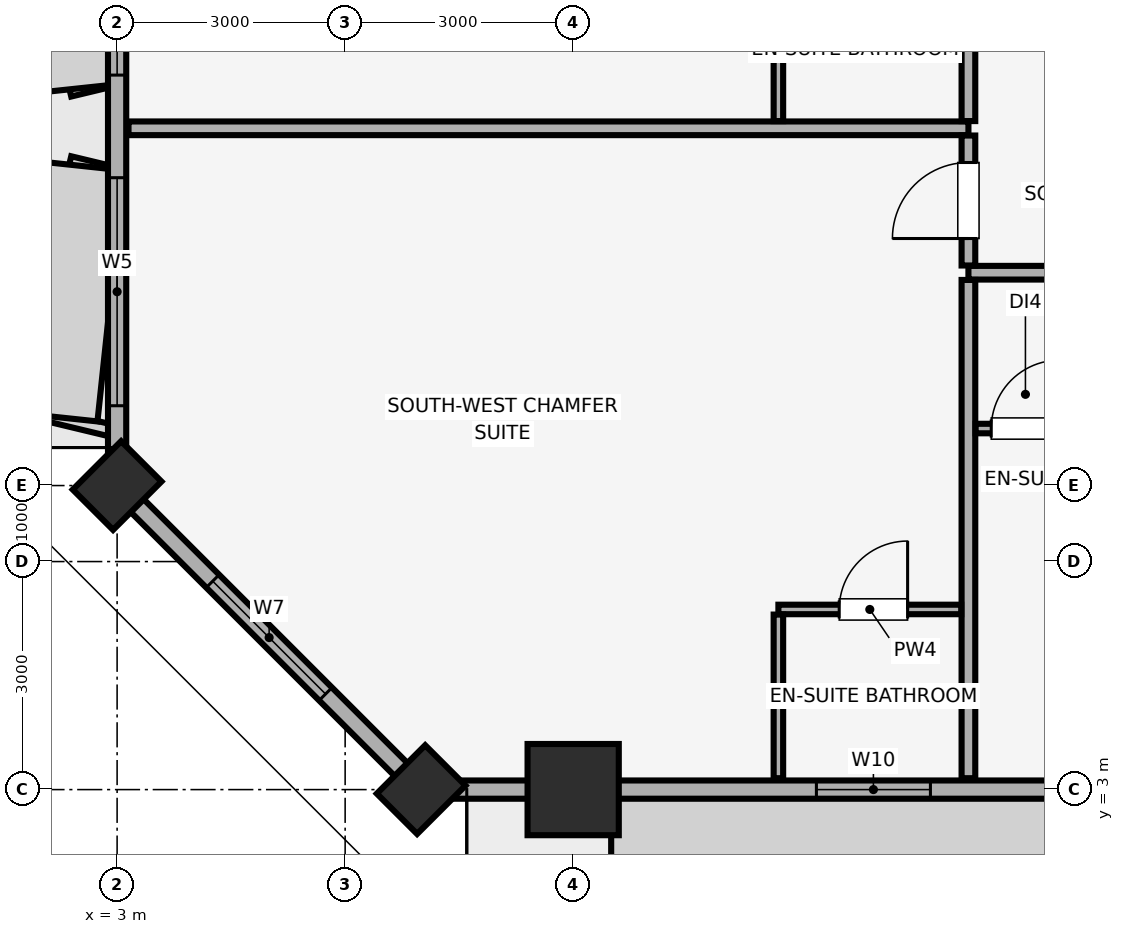
"""IFC4 building model, lengths in metres.
Left out: names, types, materials, properties, quantities, classifications, styles, units other than length and angle.
Written with IfcOpenShell. Run it as: python <this file> out.ifc"""

import sys

from ifc_helpers import new_model, si_unit, direction, frame, frame_2d, origin, origin_2d, place, context, subcontext, project, spatial, rectangle, extrude, element, fill, save


model = new_model("IFC4")
c1 = context("Model", 3, precision=1e-05, world=origin(), true_north=direction((0.0, 1.0)))
c2 = subcontext(c1, "Body", "Model", "MODEL_VIEW")
j1 = project(units=[si_unit("LENGTHUNIT", "METRE"), si_unit("PLANEANGLEUNIT", "RADIAN")], contexts=[c1])
p1 = place(None, origin())
s1 = spatial("IfcSite", under=j1, at=p1, CompositionType="ELEMENT")
p2 = place(p1, origin())
s2 = spatial("IfcBuilding", under=s1, at=p2, CompositionType="ELEMENT")
p3 = place(p2, frame((0.0, 0.0, 135.35)))
s3 = spatial("IfcBuildingStorey", under=s2, at=p3, CompositionType="ELEMENT", Elevation=135.35)
p4 = place(p3, frame((9.0, 3.0, 0.0), z_axis=(0.0, 0.0, 1.0), x_axis=(1.0, 0.0, 0.0)))
e1 = element("IfcColumn", 1, at=p4, inside=s3, PredefinedType="COLUMN", context=c2, shape_type="SweptSolid", body=[
    extrude(rectangle(XDim=1.2, YDim=1.2, at=origin_2d()), origin(), (0.0, 0.0, 1.0), 3.56),
])
for number, where, z_axis, x_axis in (
    (2, (7.0, 3.0, 0.0), (0.0, 0.0, 1.0), (0.707, 0.707, 0.0)),
    (3, (3.0, 7.0, 0.0), (0.0, 0.0, 1.0), (0.707, 0.707, 0.0)),
):
    element("IfcColumn", number, at=place(p3, frame(where, z_axis=z_axis, x_axis=x_axis)), inside=s3, PredefinedType="PILASTER", context=c2, shape_type="SweptSolid", body=[
        extrude(rectangle(XDim=0.9, YDim=0.75, at=origin_2d()), origin(), (0.0, 0.0, 1.0), 3.56),
    ])
p5 = place(p3, frame((7.0, 3.0, 0.0), z_axis=(0.0, 0.0, 1.0), x_axis=(1.0, 0.0, 0.0)))
e4 = element("IfcWall", 4, at=p5, inside=s3, PredefinedType="SOLIDWALL", context=c2, shape_type="SweptSolid", body=[
    extrude(rectangle(XDim=70.0, YDim=0.24, at=frame_2d((35.0, 0.0))), origin(), (0.0, 0.0, 1.0), 2.61),
])
p6 = place(p5, frame((19.517, 0.0, 0.0)))
e5 = element("IfcOpeningElement", 5, at=p6, cuts=e4, PredefinedType="OPENING", context=c2, shape_type="SweptSolid", body=[
    extrude(rectangle(XDim=1.1, YDim=2.15, at=frame_2d((0.55, 1.075))), frame((0.0, 0.13, 0.0), z_axis=(0.0, -1.0, 0.0), x_axis=(1.0, 0.0, 0.0)), (0.0, 0.0, 1.0), 0.26),
])
p7 = place(p5, frame((34.45, 0.0, 0.0)))
e6 = element("IfcOpeningElement", 6, at=p7, cuts=e4, PredefinedType="OPENING", context=c2, shape_type="SweptSolid", body=[
    extrude(rectangle(XDim=1.1, YDim=2.15, at=frame_2d((0.55, 1.075))), frame((0.0, 0.13, 0.0), z_axis=(0.0, -1.0, 0.0), x_axis=(1.0, 0.0, 0.0)), (0.0, 0.0, 1.0), 0.26),
])
p8 = place(p5, frame((49.421, 0.0, 0.0)))
e7 = element("IfcOpeningElement", 7, at=p8, cuts=e4, PredefinedType="OPENING", context=c2, shape_type="SweptSolid", body=[
    extrude(rectangle(XDim=1.1, YDim=2.15, at=frame_2d((0.55, 1.075))), frame((0.0, 0.13, 0.0), z_axis=(0.0, -1.0, 0.0), x_axis=(1.0, 0.0, 0.0)), (0.0, 0.0, 1.0), 0.26),
])
p9 = place(p5, frame((5.2, 0.0, 0.85)))
e8 = element("IfcOpeningElement", 8, at=p9, cuts=e4, PredefinedType="OPENING", context=c2, shape_type="SweptSolid", body=[
    extrude(rectangle(XDim=1.5, YDim=1.4, at=frame_2d((0.75, 0.7))), frame((0.0, 0.13, 0.0), z_axis=(0.0, -1.0, 0.0), x_axis=(1.0, 0.0, 0.0)), (0.0, 0.0, 1.0), 0.26),
])
p10 = place(p5, frame((10.163, 0.0, 0.85)))
e9 = element("IfcOpeningElement", 9, at=p10, cuts=e4, PredefinedType="OPENING", context=c2, shape_type="SweptSolid", body=[
    extrude(rectangle(XDim=1.5, YDim=1.4, at=frame_2d((0.75, 0.7))), frame((0.0, 0.13, 0.0), z_axis=(0.0, -1.0, 0.0), x_axis=(1.0, 0.0, 0.0)), (0.0, 0.0, 1.0), 0.26),
])
p11 = place(p5, frame((12.913, 0.0, 0.85)))
e10 = element("IfcOpeningElement", 10, at=p11, cuts=e4, PredefinedType="OPENING", context=c2, shape_type="SweptSolid", body=[
    extrude(rectangle(XDim=2.4, YDim=1.5, at=frame_2d((1.2, 0.75))), frame((0.0, 0.13, 0.0), z_axis=(0.0, -1.0, 0.0), x_axis=(1.0, 0.0, 0.0)), (0.0, 0.0, 1.0), 0.26),
])
p12 = place(p5, frame((24.45, 0.0, 0.85)))
e11 = element("IfcOpeningElement", 11, at=p12, cuts=e4, PredefinedType="OPENING", context=c2, shape_type="SweptSolid", body=[
    extrude(rectangle(XDim=2.4, YDim=1.5, at=frame_2d((1.2, 0.75))), frame((0.0, 0.13, 0.0), z_axis=(0.0, -1.0, 0.0), x_axis=(1.0, 0.0, 0.0)), (0.0, 0.0, 1.0), 0.26),
])
p13 = place(p5, frame((28.101, 0.0, 0.85)))
e12 = element("IfcOpeningElement", 12, at=p13, cuts=e4, PredefinedType="OPENING", context=c2, shape_type="SweptSolid", body=[
    extrude(rectangle(XDim=1.5, YDim=1.4, at=frame_2d((0.75, 0.7))), frame((0.0, 0.13, 0.0), z_axis=(0.0, -1.0, 0.0), x_axis=(1.0, 0.0, 0.0)), (0.0, 0.0, 1.0), 0.26),
])
p14 = place(p5, frame((40.239, 0.0, 0.85)))
e13 = element("IfcOpeningElement", 13, at=p14, cuts=e4, PredefinedType="OPENING", context=c2, shape_type="SweptSolid", body=[
    extrude(rectangle(XDim=1.5, YDim=1.4, at=frame_2d((0.75, 0.7))), frame((0.0, 0.13, 0.0), z_axis=(0.0, -1.0, 0.0), x_axis=(1.0, 0.0, 0.0)), (0.0, 0.0, 1.0), 0.26),
])
p15 = place(p5, frame((42.989, 0.0, 0.85)))
e14 = element("IfcOpeningElement", 14, at=p15, cuts=e4, PredefinedType="OPENING", context=c2, shape_type="SweptSolid", body=[
    extrude(rectangle(XDim=2.4, YDim=1.5, at=frame_2d((1.2, 0.75))), frame((0.0, 0.13, 0.0), z_axis=(0.0, -1.0, 0.0), x_axis=(1.0, 0.0, 0.0)), (0.0, 0.0, 1.0), 0.26),
])
p16 = place(p5, frame((54.581, 0.0, 0.85)))
e15 = element("IfcOpeningElement", 15, at=p16, cuts=e4, PredefinedType="OPENING", context=c2, shape_type="SweptSolid", body=[
    extrude(rectangle(XDim=2.4, YDim=1.5, at=frame_2d((1.2, 0.75))), frame((0.0, 0.13, 0.0), z_axis=(0.0, -1.0, 0.0), x_axis=(1.0, 0.0, 0.0)), (0.0, 0.0, 1.0), 0.26),
])
p17 = place(p5, frame((58.23, 0.0, 0.85)))
e16 = element("IfcOpeningElement", 16, at=p17, cuts=e4, PredefinedType="OPENING", context=c2, shape_type="SweptSolid", body=[
    extrude(rectangle(XDim=1.5, YDim=1.4, at=frame_2d((0.75, 0.7))), frame((0.0, 0.13, 0.0), z_axis=(0.0, -1.0, 0.0), x_axis=(1.0, 0.0, 0.0)), (0.0, 0.0, 1.0), 0.26),
])
p18 = place(p5, frame((63.3, 0.0, 0.85)))
e17 = element("IfcOpeningElement", 17, at=p18, cuts=e4, PredefinedType="OPENING", context=c2, shape_type="SweptSolid", body=[
    extrude(rectangle(XDim=1.5, YDim=1.4, at=frame_2d((0.75, 0.7))), frame((0.0, 0.13, 0.0), z_axis=(0.0, -1.0, 0.0), x_axis=(1.0, 0.0, 0.0)), (0.0, 0.0, 1.0), 0.26),
])
p19 = place(p3, frame((3.0, 45.0, 0.0), z_axis=(0.0, 0.0, 1.0), x_axis=(0.0, -1.0, 0.0)))
e18 = element("IfcWall", 18, at=p19, inside=s3, PredefinedType="SOLIDWALL", context=c2, shape_type="SweptSolid", body=[
    extrude(rectangle(XDim=38.0, YDim=0.24, at=frame_2d((19.0, 0.0))), origin(), (0.0, 0.0, 1.0), 2.61),
])
p20 = place(p19, frame((22.1, 0.0, 0.0)))
e19 = element("IfcOpeningElement", 19, at=p20, cuts=e18, PredefinedType="OPENING", context=c2, shape_type="SweptSolid", body=[
    extrude(rectangle(XDim=1.4, YDim=2.2, at=frame_2d((0.7, 1.1))), frame((0.0, 0.13, 0.0), z_axis=(0.0, -1.0, 0.0), x_axis=(1.0, 0.0, 0.0)), (0.0, 0.0, 1.0), 0.26),
])
p21 = place(p19, frame((33.95, 0.0, 0.85)))
e20 = element("IfcOpeningElement", 20, at=p21, cuts=e18, PredefinedType="OPENING", context=c2, shape_type="SweptSolid", body=[
    extrude(rectangle(XDim=3.0, YDim=1.5, at=frame_2d((1.5, 0.75))), frame((0.0, 0.13, 0.0), z_axis=(0.0, -1.0, 0.0), x_axis=(1.0, 0.0, 0.0)), (0.0, 0.0, 1.0), 0.26),
])
p22 = place(p19, frame((31.1, 0.0, 0.85)))
e21 = element("IfcOpeningElement", 21, at=p22, cuts=e18, PredefinedType="OPENING", context=c2, shape_type="SweptSolid", body=[
    extrude(rectangle(XDim=1.5, YDim=1.4, at=frame_2d((0.75, 0.7))), frame((0.0, 0.13, 0.0), z_axis=(0.0, -1.0, 0.0), x_axis=(1.0, 0.0, 0.0)), (0.0, 0.0, 1.0), 0.26),
])
p23 = place(p19, frame((25.16, 0.0, 0.85)))
e22 = element("IfcOpeningElement", 22, at=p23, cuts=e18, PredefinedType="OPENING", context=c2, shape_type="SweptSolid", body=[
    extrude(rectangle(XDim=3.0, YDim=1.5, at=frame_2d((1.5, 0.75))), frame((0.0, 0.13, 0.0), z_axis=(0.0, -1.0, 0.0), x_axis=(1.0, 0.0, 0.0)), (0.0, 0.0, 1.0), 0.26),
])
p24 = place(p19, frame((17.44, 0.0, 0.85)))
e23 = element("IfcOpeningElement", 23, at=p24, cuts=e18, PredefinedType="OPENING", context=c2, shape_type="SweptSolid", body=[
    extrude(rectangle(XDim=3.0, YDim=1.5, at=frame_2d((1.5, 0.75))), frame((0.0, 0.13, 0.0), z_axis=(0.0, -1.0, 0.0), x_axis=(1.0, 0.0, 0.0)), (0.0, 0.0, 1.0), 0.26),
])
p25 = place(p19, frame((9.85, 0.0, 0.85)))
e24 = element("IfcOpeningElement", 24, at=p25, cuts=e18, PredefinedType="OPENING", context=c2, shape_type="SweptSolid", body=[
    extrude(rectangle(XDim=3.0, YDim=1.5, at=frame_2d((1.5, 0.75))), frame((0.0, 0.13, 0.0), z_axis=(0.0, -1.0, 0.0), x_axis=(1.0, 0.0, 0.0)), (0.0, 0.0, 1.0), 0.26),
])
p26 = place(p19, frame((1.085, 0.0, 0.85)))
e25 = element("IfcOpeningElement", 25, at=p26, cuts=e18, PredefinedType="OPENING", context=c2, shape_type="SweptSolid", body=[
    extrude(rectangle(XDim=3.0, YDim=1.5, at=frame_2d((1.5, 0.75))), frame((0.0, 0.13, 0.0), z_axis=(0.0, -1.0, 0.0), x_axis=(1.0, 0.0, 0.0)), (0.0, 0.0, 1.0), 0.26),
])
p27 = place(p3, frame((3.0, 7.0, 0.0), z_axis=(0.0, 0.0, 1.0), x_axis=(0.707106781187, -0.707106781187, 0.0)))
e26 = element("IfcWall", 26, at=p27, inside=s3, PredefinedType="SOLIDWALL", context=c2, shape_type="SweptSolid", body=[
    extrude(rectangle(XDim=5.657, YDim=0.24, at=frame_2d((2.828, 0.0))), origin(), (0.0, 0.0, 1.0), 2.61),
])
p28 = place(p27, frame((1.778, 0.0, 0.85)))
e27 = element("IfcOpeningElement", 27, at=p28, cuts=e26, PredefinedType="OPENING", context=c2, shape_type="SweptSolid", body=[
    extrude(rectangle(XDim=2.1, YDim=1.6, at=frame_2d((1.05, 0.8))), frame((0.0, 0.13, 0.0), z_axis=(0.0, -1.0, 0.0), x_axis=(1.0, 0.0, 0.0)), (0.0, 0.0, 1.0), 0.26),
])
p29 = place(p3, frame((14.2, 9.8, 0.0), z_axis=(0.0, 0.0, 1.0), x_axis=(1.0, 0.0, 0.0)))
e28 = element("IfcWall", 28, at=p29, inside=s3, PredefinedType="PARTITIONING", context=c2, shape_type="SweptSolid", body=[
    extrude(rectangle(XDim=5.025, YDim=0.18, at=frame_2d((2.513, 0.0))), origin(), (0.0, 0.0, 1.0), 3.56),
])
p30 = place(p29, frame((3.375, 0.0, 0.0)))
e29 = element("IfcOpeningElement", 29, at=p30, cuts=e28, PredefinedType="OPENING", context=c2, shape_type="SweptSolid", body=[
    extrude(rectangle(XDim=1.0, YDim=2.15, at=frame_2d((0.5, 1.075))), frame((0.0, 0.1, 0.0), z_axis=(0.0, -1.0, 0.0), x_axis=(1.0, 0.0, 0.0)), (0.0, 0.0, 1.0), 0.2),
])
p31 = place(p3, frame((14.2, 3.15, 0.0), z_axis=(0.0, 0.0, 1.0), x_axis=(0.0, 1.0, 0.0)))
e30 = element("IfcWall", 30, at=p31, inside=s3, PredefinedType="PARTITIONING", context=c2, shape_type="SweptSolid", body=[
    extrude(rectangle(XDim=6.555, YDim=0.18, at=frame_2d((3.278, 0.0))), origin(), (0.0, 0.0, 1.0), 3.56),
])
p32 = place(p3, frame((14.295, 7.75, 0.0), z_axis=(0.0, 0.0, 1.0), x_axis=(1.0, 0.0, 0.0)))
e31 = element("IfcWall", 31, at=p32, inside=s3, PredefinedType="PARTITIONING", context=c2, shape_type="SweptSolid", body=[
    extrude(rectangle(XDim=1.905, YDim=0.125, at=frame_2d((0.953, 0.0))), origin(), (0.0, 0.0, 1.0), 3.56),
])
p33 = place(p32, frame((0.205, 0.0, 0.0)))
e32 = element("IfcOpeningElement", 32, at=p33, cuts=e31, PredefinedType="OPENING", context=c2, shape_type="SweptSolid", body=[
    extrude(rectangle(XDim=0.9, YDim=2.1, at=frame_2d((0.45, 1.05))), frame((0.0, 0.073, 0.0), z_axis=(0.0, -1.0, 0.0), x_axis=(1.0, 0.0, 0.0)), (0.0, 0.0, 1.0), 0.145),
])
p34 = place(p3, frame((3.15, 11.7, 0.0), z_axis=(0.0, 0.0, 1.0), x_axis=(1.0, 0.0, 0.0)))
e33 = element("IfcWall", 33, at=p34, inside=s3, PredefinedType="PARTITIONING", context=c2, shape_type="SweptSolid", body=[
    extrude(rectangle(XDim=11.05, YDim=0.18, at=frame_2d((5.525, 0.0))), origin(), (0.0, 0.0, 1.0), 3.56),
])
p35 = place(p3, frame((14.2, 9.895, 0.0), z_axis=(0.0, 0.0, 1.0), x_axis=(0.0, 1.0, 0.0)))
e34 = element("IfcWall", 34, at=p35, inside=s3, PredefinedType="PARTITIONING", context=c2, shape_type="SweptSolid", body=[
    extrude(rectangle(XDim=1.71, YDim=0.18, at=frame_2d((0.855, 0.0))), origin(), (0.0, 0.0, 1.0), 3.56),
])
p36 = place(p35, frame((0.355, 0.0, 0.0)))
e35 = element("IfcOpeningElement", 35, at=p36, cuts=e34, PredefinedType="OPENING", context=c2, shape_type="SweptSolid", body=[
    extrude(rectangle(XDim=1.0, YDim=2.15, at=frame_2d((0.5, 1.075))), frame((0.0, 0.1, 0.0), z_axis=(0.0, -1.0, 0.0), x_axis=(1.0, 0.0, 0.0)), (0.0, 0.0, 1.0), 0.2),
])
p37 = place(p3, frame((11.7, 5.37, 0.0), z_axis=(0.0, 0.0, 1.0), x_axis=(1.0, 0.0, 0.0)))
e36 = element("IfcWall", 36, at=p37, inside=s3, PredefinedType="PARTITIONING", context=c2, shape_type="SweptSolid", body=[
    extrude(rectangle(XDim=2.405, YDim=0.125, at=frame_2d((1.203, 0.0))), origin(), (0.0, 0.0, 1.0), 3.56),
])
p38 = place(p37, frame((0.8, 0.0, 0.0)))
e37 = element("IfcOpeningElement", 37, at=p38, cuts=e36, PredefinedType="OPENING", context=c2, shape_type="SweptSolid", body=[
    extrude(rectangle(XDim=0.9, YDim=2.1, at=frame_2d((0.45, 1.05))), frame((0.0, 0.073, 0.0), z_axis=(0.0, -1.0, 0.0), x_axis=(1.0, 0.0, 0.0)), (0.0, 0.0, 1.0), 0.145),
])
p39 = place(p3, frame((11.7, 3.15, 0.0), z_axis=(0.0, 0.0, 1.0), x_axis=(0.0, 1.0, 0.0)))
e38 = element("IfcWall", 38, at=p39, inside=s3, PredefinedType="PARTITIONING", context=c2, shape_type="SweptSolid", body=[
    extrude(rectangle(XDim=2.153, YDim=0.125, at=frame_2d((1.076, 0.0))), origin(), (0.0, 0.0, 1.0), 3.56),
])
p40 = place(p3, frame((14.2, 11.795, 0.0), z_axis=(0.0, 0.0, 1.0), x_axis=(0.0, 1.0, 0.0)))
e39 = element("IfcWall", 39, at=p40, inside=s3, PredefinedType="PARTITIONING", context=c2, shape_type="SweptSolid", body=[
    extrude(rectangle(XDim=17.51, YDim=0.18, at=frame_2d((8.755, 0.0))), origin(), (0.0, 0.0, 1.0), 3.56),
])
p41 = place(p40, frame((9.905, 0.0, 0.0)))
e40 = element("IfcOpeningElement", 40, at=p41, cuts=e39, PredefinedType="OPENING", context=c2, shape_type="SweptSolid", body=[
    extrude(rectangle(XDim=1.0, YDim=2.15, at=frame_2d((0.5, 1.075))), frame((0.0, 0.1, 0.0), z_axis=(0.0, -1.0, 0.0), x_axis=(1.0, 0.0, 0.0)), (0.0, 0.0, 1.0), 0.2),
])
p42 = place(p3, frame((11.7, 11.795, 0.0), z_axis=(0.0, 0.0, 1.0), x_axis=(0.0, 1.0, 0.0)))
e41 = element("IfcWall", 41, at=p42, inside=s3, PredefinedType="PARTITIONING", context=c2, shape_type="SweptSolid", body=[
    extrude(rectangle(XDim=2.388, YDim=0.125, at=frame_2d((1.194, 0.0))), origin(), (0.0, 0.0, 1.0), 3.56),
])
p43 = place(p28, origin())
e42 = element("IfcWindow", 42, at=p43, inside=s3, PartitioningType="SINGLE_PANEL", PredefinedType="WINDOW", context=c2, shape_type="SweptSolid", body=[
    extrude(rectangle(XDim=2.1, YDim=1.6, at=frame_2d((1.05, 0.8))), frame((0.0, 0.03, 0.0), z_axis=(0.0, -1.0, 0.0), x_axis=(1.0, 0.0, 0.0)), (0.0, 0.0, 1.0), 0.06),
])
fill(e27, e42)
p44 = place(p9, origin())
e43 = element("IfcWindow", 43, at=p44, inside=s3, PartitioningType="SINGLE_PANEL", PredefinedType="WINDOW", context=c2, shape_type="SweptSolid", body=[
    extrude(rectangle(XDim=1.5, YDim=1.4, at=frame_2d((0.75, 0.7))), frame((0.0, 0.03, 0.0), z_axis=(0.0, -1.0, 0.0), x_axis=(1.0, 0.0, 0.0)), (0.0, 0.0, 1.0), 0.06),
])
fill(e8, e43)
p45 = place(p21, origin())
e44 = element("IfcWindow", 44, at=p45, inside=s3, PartitioningType="SINGLE_PANEL", PredefinedType="WINDOW", context=c2, shape_type="SweptSolid", body=[
    extrude(rectangle(XDim=3.0, YDim=1.5, at=frame_2d((1.5, 0.75))), frame((0.0, 0.03, 0.0), z_axis=(0.0, -1.0, 0.0), x_axis=(1.0, 0.0, 0.0)), (0.0, 0.0, 1.0), 0.06),
])
fill(e20, e44)
p46 = place(p22, origin())
e45 = element("IfcWindow", 45, at=p46, inside=s3, PartitioningType="SINGLE_PANEL", PredefinedType="WINDOW", context=c2, shape_type="SweptSolid", body=[
    extrude(rectangle(XDim=1.5, YDim=1.4, at=frame_2d((0.75, 0.7))), frame((0.0, 0.03, 0.0), z_axis=(0.0, -1.0, 0.0), x_axis=(1.0, 0.0, 0.0)), (0.0, 0.0, 1.0), 0.06),
])
fill(e21, e45)
p47 = place(p33, origin())
e46 = element("IfcDoor", 46, at=p47, inside=s3, OperationType="SINGLE_SWING_RIGHT", PredefinedType="DOOR", context=c2, shape_type="SweptSolid", body=[
    extrude(rectangle(XDim=0.9, YDim=2.1, at=frame_2d((0.45, 1.05))), frame((0.0, 0.025, 0.0), z_axis=(0.0, -1.0, 0.0), x_axis=(1.0, 0.0, 0.0)), (0.0, 0.0, 1.0), 0.05),
])
fill(e32, e46)
p48 = place(p36, origin())
e47 = element("IfcDoor", 47, at=p48, inside=s3, OperationType="SINGLE_SWING_LEFT", PredefinedType="DOOR", context=c2, shape_type="SweptSolid", body=[
    extrude(rectangle(XDim=1.0, YDim=2.15, at=frame_2d((0.5, 1.075))), frame((0.0, 0.025, 0.0), z_axis=(0.0, -1.0, 0.0), x_axis=(1.0, 0.0, 0.0)), (0.0, 0.0, 1.0), 0.05),
])
fill(e35, e47)
p49 = place(p38, origin())
e48 = element("IfcDoor", 48, at=p49, inside=s3, OperationType="SINGLE_SWING_RIGHT", PredefinedType="DOOR", context=c2, shape_type="SweptSolid", body=[
    extrude(rectangle(XDim=0.9, YDim=2.1, at=frame_2d((0.45, 1.05))), frame((0.0, 0.025, 0.0), z_axis=(0.0, -1.0, 0.0), x_axis=(1.0, 0.0, 0.0)), (0.0, 0.0, 1.0), 0.05),
])
fill(e37, e48)
save(model, sys.argv[1])
